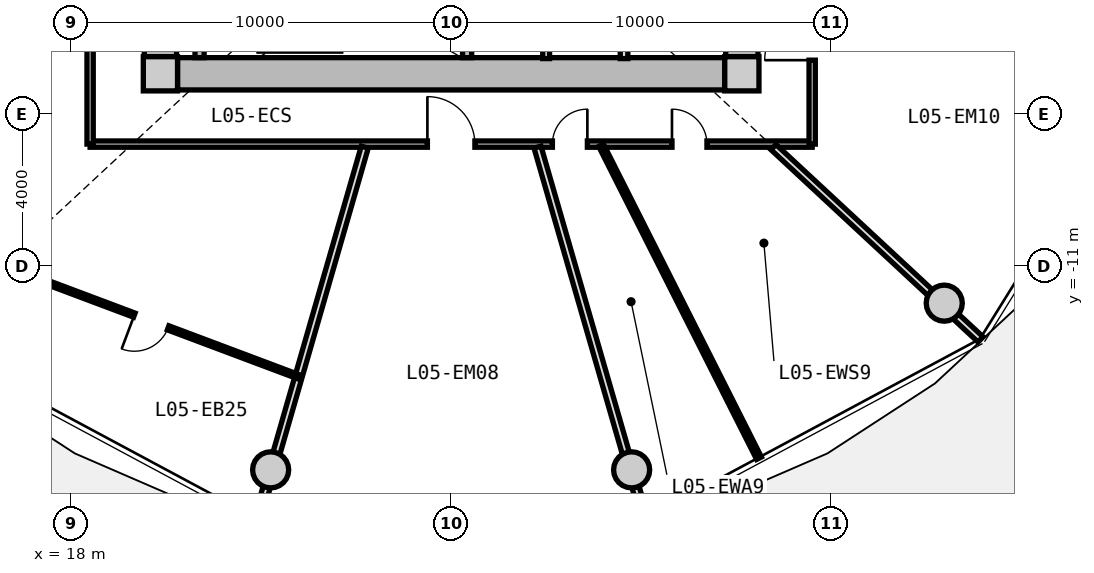
"""IFC4 building model, lengths in metres.
Left out: names, types, materials, properties, quantities, classifications, styles, units other than length and angle.
Written with IfcOpenShell. Run it as: python <this file> out.ifc"""

import sys

from ifc_helpers import new_model, si_unit, direction, frame, frame_2d, origin, origin_2d, place, context, subcontext, project, spatial, rectangle, circle, extrude, source, transform, mapped, element, fill, save


model = new_model("IFC4")
c1 = context("Model", 3, precision=1e-05, world=origin(), true_north=direction((0.0, 1.0)))
c2 = subcontext(c1, "Body", "Model", "MODEL_VIEW")
j1 = project(units=[si_unit("LENGTHUNIT", "METRE"), si_unit("PLANEANGLEUNIT", "RADIAN")], contexts=[c1])
p1 = place(None, origin())
s1 = spatial("IfcSite", under=j1, at=p1, CompositionType="ELEMENT")
p2 = place(p1, origin())
s2 = spatial("IfcBuilding", under=s1, at=p2, CompositionType="ELEMENT")
p3 = place(p2, frame((0.0, 0.0, 21.6)))
s3 = spatial("IfcBuildingStorey", under=s2, at=p3, CompositionType="ELEMENT", Elevation=21.6)
m1 = source(origin(), c2, "Body", "SweptSolid", [
    extrude(rectangle(XDim=0.9, YDim=0.9, at=origin_2d()), origin(), (0.0, 0.0, 1.0), 3.05),
])
for number, where, z_axis, x_axis in (
    (1, (20.35, -5.95, 0.0), (0.0, 0.0, 1.0), (1.0, 0.0, 0.0)),
    (2, (35.65, -5.95, 0.0), (0.0, 0.0, 1.0), (1.0, 0.0, 0.0)),
):
    element("IfcColumn", number, at=place(p3, frame(where, z_axis=z_axis, x_axis=x_axis)), inside=s3, PredefinedType="COLUMN", context=c2, shape_type="MappedRepresentation", body=[
        mapped(m1, transform((0.0, 0.0, 0.0), x_axis=(1.0, 0.0, 0.0), y_axis=(0.0, 1.0, 0.0), z_axis=(0.0, 0.0, 1.0), scale=1.0)),
    ])
m2 = source(origin(), c2, "Body", "SweptSolid", [
    extrude(rectangle(XDim=14.4, YDim=0.85, at=frame_2d((7.2, 0.0))), origin(), (0.0, 0.0, 1.0), 2.79),
])
p4 = place(p3, frame((35.2, -5.95, 0.0), z_axis=(0.0, 0.0, 1.0), x_axis=(-1.0, 0.0, 0.0)))
e3 = element("IfcWall", 3, at=p4, inside=s3, PredefinedType="SHEAR", context=c2, shape_type="MappedRepresentation", body=[
    mapped(m2, transform((0.0, 0.0, 0.0), x_axis=(1.0, 0.0, 0.0), y_axis=(0.0, 1.0, 0.0), z_axis=(0.0, 0.0, 1.0), scale=1.0)),
])
m3 = source(origin(), c2, "Body", "SweptSolid", [
    extrude(rectangle(XDim=11.0, YDim=0.85, at=frame_2d((5.5, 0.0))), origin(), (0.0, 0.0, 1.0), 2.79),
])
p5 = place(p3, frame((20.35, -5.5, 0.0), z_axis=(0.0, 0.0, 1.0), x_axis=(0.0, 1.0, 0.0)))
e4 = element("IfcWall", 4, at=p5, inside=s3, PredefinedType="SHEAR", context=c2, shape_type="MappedRepresentation", body=[
    mapped(m3, transform((0.0, 0.0, 0.0), x_axis=(1.0, 0.0, 0.0), y_axis=(0.0, 1.0, 0.0), z_axis=(0.0, 0.0, 1.0), scale=1.0)),
])
p6 = place(p5, frame((3.8, 0.0, 0.0)))
e5 = element("IfcOpeningElement", 5, at=p6, cuts=e4, PredefinedType="OPENING", context=c2, shape_type="SweptSolid", body=[
    extrude(rectangle(XDim=1.2, YDim=2.15, at=frame_2d((0.6, 1.075))), frame((0.0, 0.435, 0.0), z_axis=(0.0, -1.0, 0.0), x_axis=(1.0, 0.0, 0.0)), (0.0, 0.0, 1.0), 0.87),
])
p7 = place(p3, frame((35.65, 5.5, 0.0), z_axis=(0.0, 0.0, 1.0), x_axis=(0.0, -1.0, 0.0)))
e6 = element("IfcWall", 6, at=p7, inside=s3, PredefinedType="SHEAR", context=c2, shape_type="MappedRepresentation", body=[
    mapped(m3, transform((0.0, 0.0, 0.0), x_axis=(1.0, 0.0, 0.0), y_axis=(0.0, 1.0, 0.0), z_axis=(0.0, 0.0, 1.0), scale=1.0)),
])
p8 = place(p7, frame((5.65, 0.0, 0.0)))
e7 = element("IfcOpeningElement", 7, at=p8, cuts=e6, PredefinedType="OPENING", context=c2, shape_type="SweptSolid", body=[
    extrude(rectangle(XDim=1.2, YDim=2.15, at=frame_2d((0.6, 1.075))), frame((0.0, 0.435, 0.0), z_axis=(0.0, -1.0, 0.0), x_axis=(1.0, 0.0, 0.0)), (0.0, 0.0, 1.0), 0.87),
])
p9 = place(p7, frame((9.3, 0.0, 0.0)))
e8 = element("IfcOpeningElement", 8, at=p9, cuts=e6, PredefinedType="OPENING", context=c2, shape_type="SweptSolid", body=[
    extrude(rectangle(XDim=1.0, YDim=2.1, at=frame_2d((0.5, 1.05))), frame((0.0, 0.435, 0.0), z_axis=(0.0, -1.0, 0.0), x_axis=(1.0, 0.0, 0.0)), (0.0, 0.0, 1.0), 0.87),
])
m4 = source(origin(), c2, "Body", "SweptSolid", [
    extrude(circle(Radius=0.475, at=origin_2d()), origin(), (0.0, 0.0, 1.0), 3.47),
])
for number, where, z_axis, x_axis in (
    (9, (23.251, -16.373, -0.42), (0.0, 0.0, 1.0), (1.0, 0.0, 0.0)),
    (10, (32.749, -16.373, -0.42), (0.0, 0.0, 1.0), (1.0, 0.0, 0.0)),
    (11, (40.975, -11.985, -0.42), (0.0, 0.0, 1.0), (1.0, 0.0, 0.0)),
):
    element("IfcColumn", number, at=place(p3, frame(where, z_axis=z_axis, x_axis=x_axis)), inside=s3, PredefinedType="COLUMN", context=c2, shape_type="MappedRepresentation", body=[
        mapped(m4, transform((0.0, 0.0, 0.0), x_axis=(1.0, 0.0, 0.0), y_axis=(0.0, 1.0, 0.0), z_axis=(0.0, 0.0, 1.0), scale=1.0)),
    ])
m5 = source(origin(), c2, "Body", "SweptSolid", [
    extrude(rectangle(XDim=3.075, YDim=0.24, at=frame_2d((1.538, 0.0))), origin(), (0.0, 0.0, 1.0), 2.79),
])
for number, where, z_axis, x_axis in (
    (12, (21.38, -5.525, 0.0), (0.0, 0.0, 1.0), (0.0, 1.0, 0.0)),
    (13, (28.42, -5.525, 0.0), (0.0, 0.0, 1.0), (0.0, 1.0, 0.0)),
):
    element("IfcWall", number, at=place(p3, frame(where, z_axis=z_axis, x_axis=x_axis)), inside=s3, PredefinedType="PARTITIONING", context=c2, shape_type="MappedRepresentation", body=[
        mapped(m5, transform((0.0, 0.0, 0.0), x_axis=(1.0, 0.0, 0.0), y_axis=(0.0, 1.0, 0.0), z_axis=(0.0, 0.0, 1.0), scale=1.0)),
    ])
m6 = source(origin(), c2, "Body", "SweptSolid", [
    extrude(rectangle(XDim=3.8, YDim=0.2, at=frame_2d((1.9, 0.0))), origin(), (0.0, 0.0, 1.0), 2.775),
])
p10 = place(p3, frame((32.55, -5.55, 0.0), z_axis=(0.0, 0.0, 1.0), x_axis=(0.0, 1.0, 0.0)))
e14 = element("IfcWall", 14, at=p10, inside=s3, PredefinedType="PARTITIONING", context=c2, shape_type="MappedRepresentation", body=[
    mapped(m6, transform((0.0, 0.0, 0.0), x_axis=(1.0, 0.0, 0.0), y_axis=(0.0, 1.0, 0.0), z_axis=(0.0, 0.0, 1.0), scale=1.0)),
])
m7 = source(origin(), c2, "Body", "SweptSolid", [
    extrude(rectangle(XDim=3.22, YDim=0.18, at=frame_2d((1.61, 0.0))), origin(), (0.0, 0.0, 1.0), 2.775),
])
p11 = place(p3, frame((30.5, -5.55, 0.0), z_axis=(0.0, 0.0, 1.0), x_axis=(0.0, 1.0, 0.0)))
e15 = element("IfcWall", 15, at=p11, inside=s3, PredefinedType="PARTITIONING", context=c2, shape_type="MappedRepresentation", body=[
    mapped(m7, transform((0.0, 0.0, 0.0), x_axis=(1.0, 0.0, 0.0), y_axis=(0.0, 1.0, 0.0), z_axis=(0.0, 0.0, 1.0), scale=1.0)),
])
m8 = source(origin(), c2, "Body", "SweptSolid", [
    extrude(rectangle(XDim=19.0, YDim=0.165, at=frame_2d((9.5, 0.0))), origin(), (0.0, 0.0, 1.0), 2.775),
])
p12 = place(p3, frame((37.5, -7.8, 0.0), z_axis=(0.0, 0.0, 1.0), x_axis=(-1.0, 0.0, 0.0)))
e16 = element("IfcWall", 16, at=p12, inside=s3, PredefinedType="PARTITIONING", context=c2, shape_type="MappedRepresentation", body=[
    mapped(m8, transform((0.0, 0.0, 0.0), x_axis=(1.0, 0.0, 0.0), y_axis=(0.0, 1.0, 0.0), z_axis=(0.0, 0.0, 1.0), scale=1.0)),
])
p13 = place(p12, frame((8.875, 0.0, 0.0)))
e17 = element("IfcOpeningElement", 17, at=p13, cuts=e16, PredefinedType="OPENING", context=c2, shape_type="SweptSolid", body=[
    extrude(rectangle(XDim=1.25, YDim=2.2, at=frame_2d((0.625, 1.1))), frame((0.0, 0.093, 0.0), z_axis=(0.0, -1.0, 0.0), x_axis=(1.0, 0.0, 0.0)), (0.0, 0.0, 1.0), 0.185),
])
p14 = place(p12, frame((5.915, 0.0, 0.0)))
e18 = element("IfcOpeningElement", 18, at=p14, cuts=e16, PredefinedType="OPENING", context=c2, shape_type="SweptSolid", body=[
    extrude(rectangle(XDim=0.92, YDim=2.1, at=frame_2d((0.46, 1.05))), frame((0.0, 0.093, 0.0), z_axis=(0.0, -1.0, 0.0), x_axis=(1.0, 0.0, 0.0)), (0.0, 0.0, 1.0), 0.185),
])
p15 = place(p12, frame((2.769, 0.0, 0.0)))
e19 = element("IfcOpeningElement", 19, at=p15, cuts=e16, PredefinedType="OPENING", context=c2, shape_type="SweptSolid", body=[
    extrude(rectangle(XDim=0.92, YDim=2.1, at=frame_2d((0.46, 1.05))), frame((0.0, 0.093, 0.0), z_axis=(0.0, -1.0, 0.0), x_axis=(1.0, 0.0, 0.0)), (0.0, 0.0, 1.0), 0.185),
])
m9 = source(origin(), c2, "Body", "SweptSolid", [
    extrude(rectangle(XDim=15.6, YDim=0.165, at=frame_2d((7.8, 0.0))), origin(), (0.0, 0.0, 1.0), 2.775),
])
p16 = place(p3, frame((18.5, -7.8, 0.0), z_axis=(0.0, 0.0, 1.0), x_axis=(0.0, 1.0, 0.0)))
e20 = element("IfcWall", 20, at=p16, inside=s3, PredefinedType="PARTITIONING", context=c2, shape_type="MappedRepresentation", body=[
    mapped(m9, transform((0.0, 0.0, 0.0), x_axis=(1.0, 0.0, 0.0), y_axis=(0.0, 1.0, 0.0), z_axis=(0.0, 0.0, 1.0), scale=1.0)),
])
p17 = place(p16, frame((12.241, 0.0, 0.0)))
e21 = element("IfcOpeningElement", 21, at=p17, cuts=e20, PredefinedType="OPENING", context=c2, shape_type="SweptSolid", body=[
    extrude(rectangle(XDim=1.05, YDim=2.15, at=frame_2d((0.525, 1.075))), frame((0.0, 0.093, 0.0), z_axis=(0.0, -1.0, 0.0), x_axis=(1.0, 0.0, 0.0)), (0.0, 0.0, 1.0), 0.185),
])
p18 = place(p16, frame((3.63, 0.0, 0.0)))
e22 = element("IfcOpeningElement", 22, at=p18, cuts=e20, PredefinedType="OPENING", context=c2, shape_type="SweptSolid", body=[
    extrude(rectangle(XDim=1.05, YDim=2.15, at=frame_2d((0.525, 1.075))), frame((0.0, 0.093, 0.0), z_axis=(0.0, -1.0, 0.0), x_axis=(1.0, 0.0, 0.0)), (0.0, 0.0, 1.0), 0.185),
])
p19 = place(p3, frame((37.5, 7.8, 0.0), z_axis=(0.0, 0.0, 1.0), x_axis=(0.0, -1.0, 0.0)))
e23 = element("IfcWall", 23, at=p19, inside=s3, PredefinedType="PARTITIONING", context=c2, shape_type="MappedRepresentation", body=[
    mapped(m9, transform((0.0, 0.0, 0.0), x_axis=(1.0, 0.0, 0.0), y_axis=(0.0, 1.0, 0.0), z_axis=(0.0, 0.0, 1.0), scale=1.0)),
])
p20 = place(p19, frame((12.141, 0.0, 0.0)))
e24 = element("IfcOpeningElement", 24, at=p20, cuts=e23, PredefinedType="OPENING", context=c2, shape_type="SweptSolid", body=[
    extrude(rectangle(XDim=1.25, YDim=2.2, at=frame_2d((0.625, 1.1))), frame((0.0, 0.093, 0.0), z_axis=(0.0, -1.0, 0.0), x_axis=(1.0, 0.0, 0.0)), (0.0, 0.0, 1.0), 0.185),
])
p21 = place(p19, frame((6.196, 0.0, 0.0)))
e25 = element("IfcOpeningElement", 25, at=p21, cuts=e23, PredefinedType="OPENING", context=c2, shape_type="SweptSolid", body=[
    extrude(rectangle(XDim=1.05, YDim=2.15, at=frame_2d((0.525, 1.075))), frame((0.0, 0.093, 0.0), z_axis=(0.0, -1.0, 0.0), x_axis=(1.0, 0.0, 0.0)), (0.0, 0.0, 1.0), 0.185),
])
p22 = place(p19, frame((1.092, 0.0, 0.0)))
e26 = element("IfcOpeningElement", 26, at=p22, cuts=e23, PredefinedType="OPENING", context=c2, shape_type="SweptSolid", body=[
    extrude(rectangle(XDim=1.05, YDim=2.15, at=frame_2d((0.525, 1.075))), frame((0.0, 0.093, 0.0), z_axis=(0.0, -1.0, 0.0), x_axis=(1.0, 0.0, 0.0)), (0.0, 0.0, 1.0), 0.185),
])
m10 = source(origin(), c2, "Body", "SweptSolid", [
    extrude(rectangle(XDim=10.196, YDim=0.19, at=frame_2d((5.098, 0.0))), origin(), (0.0, 0.0, 1.0), 2.225),
])
p23 = place(p3, frame((25.727, -7.88, 0.0), z_axis=(0.0, 0.0, 1.0), x_axis=(-0.277136420347, -0.960830580549, 0.0)))
e27 = element("IfcWall", 27, at=p23, inside=s3, PredefinedType="PARTITIONING", context=c2, shape_type="MappedRepresentation", body=[
    mapped(m10, transform((0.0, 0.0, 0.0), x_axis=(1.0, 0.0, 0.0), y_axis=(0.0, 1.0, 0.0), z_axis=(0.0, 0.0, 1.0), scale=1.0)),
])
m11 = source(origin(), c2, "Body", "SweptSolid", [
    extrude(rectangle(XDim=8.32, YDim=0.115, at=frame_2d((4.16, 0.0))), origin(), (0.0, 0.0, 1.0), 2.775),
])
p24 = place(p3, frame((16.214, -11.006, 0.0), z_axis=(0.0, 0.0, 1.0), x_axis=(0.936180763098, -0.351518959382, 0.0)))
e28 = element("IfcWall", 28, at=p24, inside=s3, PredefinedType="PARTITIONING", context=c2, shape_type="MappedRepresentation", body=[
    mapped(m11, transform((0.0, 0.0, 0.0), x_axis=(1.0, 0.0, 0.0), y_axis=(0.0, 1.0, 0.0), z_axis=(0.0, 0.0, 1.0), scale=1.0)),
])
p25 = place(p24, frame((3.685, 0.0, 0.0)))
e29 = element("IfcOpeningElement", 29, at=p25, cuts=e28, PredefinedType="OPENING", context=c2, shape_type="SweptSolid", body=[
    extrude(rectangle(XDim=0.95, YDim=2.1, at=frame_2d((0.475, 1.05))), frame((0.0, 0.067, 0.0), z_axis=(0.0, -1.0, 0.0), x_axis=(1.0, 0.0, 0.0)), (0.0, 0.0, 1.0), 0.135),
])
p26 = place(p3, frame((30.273, -7.88, 0.0), z_axis=(0.0, 0.0, 1.0), x_axis=(0.277136420347, -0.960830580549, 0.0)))
e30 = element("IfcWall", 30, at=p26, inside=s3, PredefinedType="PARTITIONING", context=c2, shape_type="MappedRepresentation", body=[
    mapped(m10, transform((0.0, 0.0, 0.0), x_axis=(1.0, 0.0, 0.0), y_axis=(0.0, 1.0, 0.0), z_axis=(0.0, 0.0, 1.0), scale=1.0)),
])
m12 = source(origin(), c2, "Body", "SweptSolid", [
    extrude(rectangle(XDim=7.435, YDim=0.19, at=frame_2d((3.717, 0.0))), origin(), (0.0, 0.0, 1.0), 2.225),
])
p27 = place(p3, frame((36.483, -7.88, 0.0), z_axis=(0.0, 0.0, 1.0), x_axis=(0.732651956848, -0.680603489652, 0.0)))
e31 = element("IfcWall", 31, at=p27, inside=s3, PredefinedType="PARTITIONING", context=c2, shape_type="MappedRepresentation", body=[
    mapped(m12, transform((0.0, 0.0, 0.0), x_axis=(1.0, 0.0, 0.0), y_axis=(0.0, 1.0, 0.0), z_axis=(0.0, 0.0, 1.0), scale=1.0)),
])
m13 = source(origin(), c2, "Body", "SweptSolid", [
    extrude(rectangle(XDim=9.225, YDim=0.14, at=frame_2d((4.613, 0.0))), origin(), (0.0, 0.0, 1.0), 2.775),
])
p28 = place(p3, frame((31.946, -7.83, 0.0), z_axis=(0.0, 0.0, 1.0), x_axis=(0.450460543767, -0.892796336523, 0.0)))
e32 = element("IfcWall", 32, at=p28, inside=s3, PredefinedType="PARTITIONING", context=c2, shape_type="MappedRepresentation", body=[
    mapped(m13, transform((0.0, 0.0, 0.0), x_axis=(1.0, 0.0, 0.0), y_axis=(0.0, 1.0, 0.0), z_axis=(0.0, 0.0, 1.0), scale=1.0)),
])
m14 = source(origin(), c2, "Body", "SweptSolid", [
    extrude(rectangle(XDim=0.95, YDim=2.1, at=frame_2d((0.475, 1.05))), frame((0.0, 0.025, 0.0), z_axis=(0.0, -1.0, 0.0), x_axis=(1.0, 0.0, 0.0)), (0.0, 0.0, 1.0), 0.05),
])
p29 = place(p25, frame((0.95, 0.0, 0.0), z_axis=(0.0, 0.0, 1.0), x_axis=(-1.0, 0.0, 0.0)))
e33 = element("IfcDoor", 33, at=p29, inside=s3, OperationType="SINGLE_SWING_RIGHT", PredefinedType="DOOR", context=c2, shape_type="MappedRepresentation", body=[
    mapped(m14, transform((0.0, 0.0, 0.0), x_axis=(1.0, 0.0, 0.0), y_axis=(0.0, 1.0, 0.0), z_axis=(0.0, 0.0, 1.0), scale=1.0)),
])
fill(e29, e33)
m15 = source(origin(), c2, "Body", "SweptSolid", [
    extrude(rectangle(XDim=1.25, YDim=2.2, at=frame_2d((0.625, 1.1))), frame((0.0, 0.025, 0.0), z_axis=(0.0, -1.0, 0.0), x_axis=(1.0, 0.0, 0.0)), (0.0, 0.0, 1.0), 0.05),
])
p30 = place(p13, frame((1.25, 0.0, 0.0), z_axis=(0.0, 0.0, 1.0), x_axis=(-1.0, 0.0, 0.0)))
e34 = element("IfcDoor", 34, at=p30, inside=s3, OperationType="SINGLE_SWING_LEFT", PredefinedType="DOOR", context=c2, shape_type="MappedRepresentation", body=[
    mapped(m15, transform((0.0, 0.0, 0.0), x_axis=(1.0, 0.0, 0.0), y_axis=(0.0, 1.0, 0.0), z_axis=(0.0, 0.0, 1.0), scale=1.0)),
])
fill(e17, e34)
m16 = source(origin(), c2, "Body", "SweptSolid", [
    extrude(rectangle(XDim=0.92, YDim=2.1, at=frame_2d((0.46, 1.05))), frame((0.0, 0.025, 0.0), z_axis=(0.0, -1.0, 0.0), x_axis=(1.0, 0.0, 0.0)), (0.0, 0.0, 1.0), 0.05),
])
p31 = place(p14, frame((0.92, 0.0, 0.0), z_axis=(0.0, 0.0, 1.0), x_axis=(-1.0, 0.0, 0.0)))
e35 = element("IfcDoor", 35, at=p31, inside=s3, OperationType="SINGLE_SWING_RIGHT", PredefinedType="DOOR", context=c2, shape_type="MappedRepresentation", body=[
    mapped(m16, transform((0.0, 0.0, 0.0), x_axis=(1.0, 0.0, 0.0), y_axis=(0.0, 1.0, 0.0), z_axis=(0.0, 0.0, 1.0), scale=1.0)),
])
fill(e18, e35)
p32 = place(p15, frame((0.92, 0.0, 0.0), z_axis=(0.0, 0.0, 1.0), x_axis=(-1.0, 0.0, 0.0)))
e36 = element("IfcDoor", 36, at=p32, inside=s3, OperationType="SINGLE_SWING_LEFT", PredefinedType="DOOR", context=c2, shape_type="MappedRepresentation", body=[
    mapped(m16, transform((0.0, 0.0, 0.0), x_axis=(1.0, 0.0, 0.0), y_axis=(0.0, 1.0, 0.0), z_axis=(0.0, 0.0, 1.0), scale=1.0)),
])
fill(e19, e36)
p33 = place(p20, frame((1.25, 0.0, 0.0), z_axis=(0.0, 0.0, 1.0), x_axis=(-1.0, 0.0, 0.0)))
e37 = element("IfcDoor", 37, at=p33, inside=s3, OperationType="SINGLE_SWING_LEFT", PredefinedType="DOOR", context=c2, shape_type="MappedRepresentation", body=[
    mapped(m15, transform((0.0, 0.0, 0.0), x_axis=(1.0, 0.0, 0.0), y_axis=(0.0, 1.0, 0.0), z_axis=(0.0, 0.0, 1.0), scale=1.0)),
])
fill(e24, e37)
save(model, sys.argv[1])
